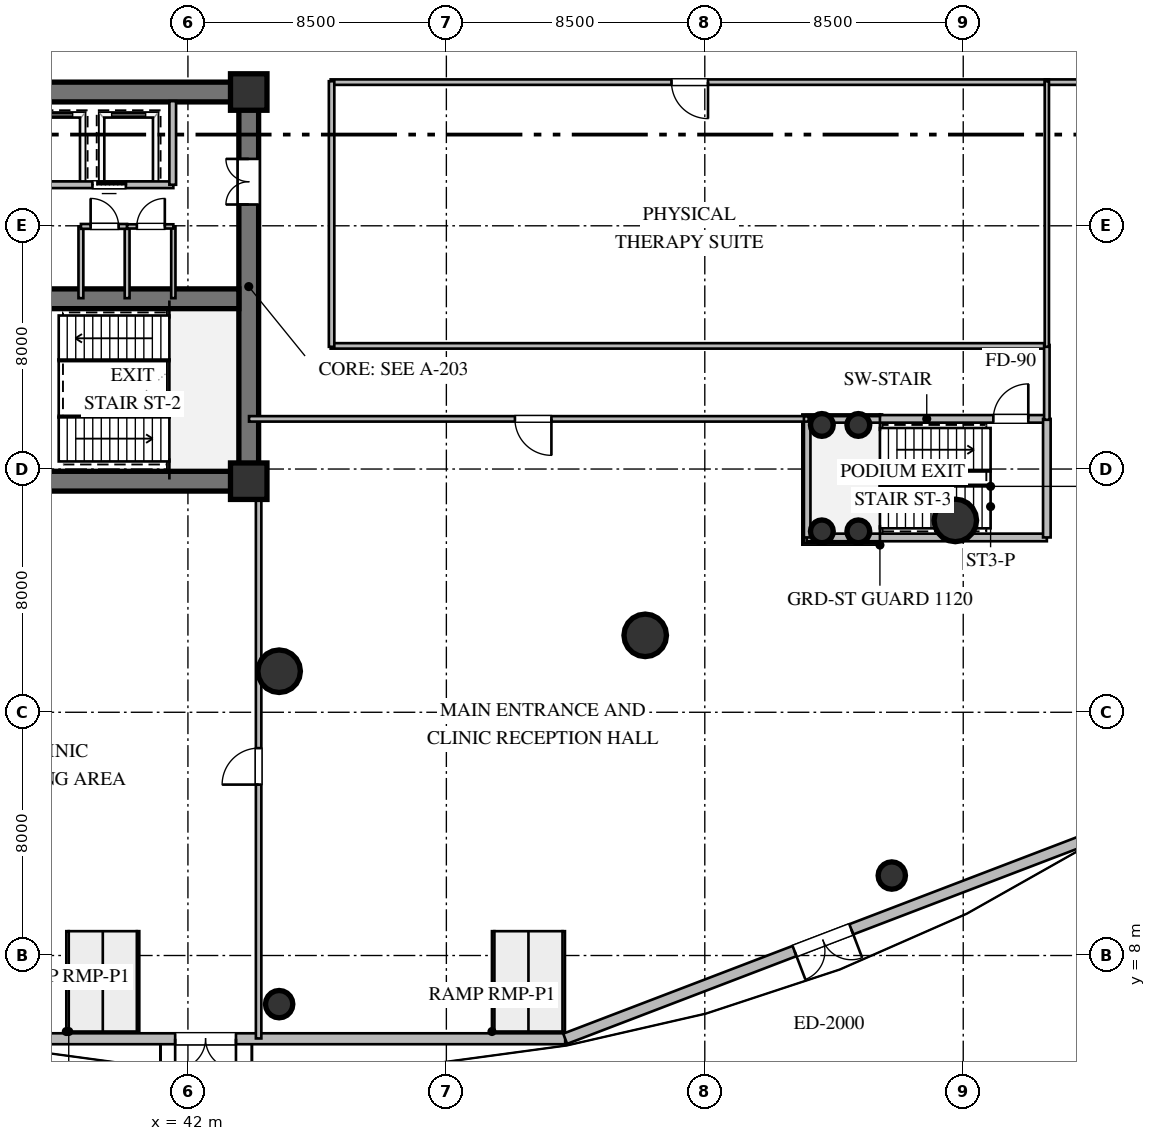
"""IFC4 building model, lengths in metres.
Left out: names, types, materials, properties, quantities, classifications, styles, units other than length and angle.
Written with IfcOpenShell. Run it as: python <this file> out.ifc"""

import sys

from ifc_helpers import new_model, si_unit, direction, frame, frame_2d, origin, origin_2d, place, context, subcontext, project, spatial, rectangle, circle, extrude, element, fill, save


model = new_model("IFC4")
c1 = context("Model", 3, precision=1e-05, world=origin(), true_north=direction((0.0, 1.0)))
c2 = subcontext(c1, "Body", "Model", "MODEL_VIEW")
j1 = project(units=[si_unit("LENGTHUNIT", "METRE"), si_unit("PLANEANGLEUNIT", "RADIAN")], contexts=[c1])
p1 = place(None, origin())
s1 = spatial("IfcSite", under=j1, at=p1, CompositionType="ELEMENT")
p2 = place(p1, origin())
s2 = spatial("IfcBuilding", under=s1, at=p2, CompositionType="ELEMENT")
p3 = place(p2, origin())
s3 = spatial("IfcBuildingStorey", under=s2, at=p3, CompositionType="ELEMENT", Elevation=0.0)
for number, where, z_axis, x_axis in (
    (1, (21.675, 23.6, 0.0), (0.0, 0.0, 1.0), (1.0, 0.0, 0.0)),
    (2, (21.675, 36.4, 0.0), (0.0, 0.0, 1.0), (1.0, 0.0, 0.0)),
):
    element("IfcWall", number, at=place(p3, frame(where, z_axis=z_axis, x_axis=x_axis)), inside=s3, PredefinedType="SHEAR", context=c2, shape_type="SweptSolid", body=[
        extrude(rectangle(XDim=22.65, YDim=0.65, at=frame_2d((11.325, 0.0))), origin(), (0.0, 0.0, 1.0), 4.52),
    ])
p4 = place(p3, frame((44.0, 23.925, 0.0), z_axis=(0.0, 0.0, 1.0), x_axis=(0.0, 1.0, 0.0)))
e3 = element("IfcWall", 3, at=p4, inside=s3, PredefinedType="SHEAR", context=c2, shape_type="SweptSolid", body=[
    extrude(rectangle(XDim=12.15, YDim=0.65, at=frame_2d((6.075, 0.0))), origin(), (0.0, 0.0, 1.0), 4.52),
])
p5 = place(p4, frame((8.775, 0.0, 0.0)))
e4 = element("IfcOpeningElement", 4, at=p5, cuts=e3, PredefinedType="OPENING", context=c2, shape_type="SweptSolid", body=[
    extrude(rectangle(XDim=1.5, YDim=2.15, at=frame_2d((0.75, 1.075))), frame((0.0, 0.335, 0.0), z_axis=(0.0, -1.0, 0.0), x_axis=(1.0, 0.0, 0.0)), (0.0, 0.0, 1.0), 0.67),
])
p6 = place(p3, frame((22.325, 29.6, 0.0), z_axis=(0.0, 0.0, 1.0), x_axis=(1.0, 0.0, 0.0)))
e5 = element("IfcWall", 5, at=p6, inside=s3, PredefinedType="SHEAR", context=c2, shape_type="SweptSolid", body=[
    extrude(rectangle(XDim=21.35, YDim=0.65, at=frame_2d((10.675, 0.0))), origin(), (0.0, 0.0, 1.0), 4.52),
])
p7 = place(p6, frame((12.125, 0.0, 0.0)))
e6 = element("IfcOpeningElement", 6, at=p7, cuts=e5, PredefinedType="OPENING", context=c2, shape_type="SweptSolid", body=[
    extrude(rectangle(XDim=1.15, YDim=2.1, at=frame_2d((0.575, 1.05))), frame((0.0, 0.335, 0.0), z_axis=(0.0, -1.0, 0.0), x_axis=(1.0, 0.0, 0.0)), (0.0, 0.0, 1.0), 0.67),
])
for number, where, z_axis, x_axis in (
    (7, (44.0, 23.6, 0.0), (0.0, 0.0, 1.0), (1.0, 0.0, 0.0)),
    (8, (44.0, 36.4, 0.0), (0.0, 0.0, 1.0), (1.0, 0.0, 0.0)),
):
    element("IfcColumn", number, at=place(p3, frame(where, z_axis=z_axis, x_axis=x_axis)), inside=s3, PredefinedType="COLUMN", context=c2, shape_type="SweptSolid", body=[
        extrude(rectangle(XDim=1.2, YDim=1.2, at=origin_2d()), origin(), (0.0, 0.0, 1.0), 4.8),
    ])
for number, where, z_axis, x_axis in (
    (9, (45.0, 17.35, 0.0), (0.0, 0.0, 1.0), (1.0, 0.0, 0.0)),
    (10, (57.04, 18.53, 0.0), (0.0, 0.0, 1.0), (1.0, 0.0, 0.0)),
    (11, (67.24, 22.31, 0.0), (0.0, 0.0, 1.0), (1.0, 0.0, 0.0)),
):
    element("IfcColumn", number, at=place(p3, frame(where, z_axis=z_axis, x_axis=x_axis)), inside=s3, PredefinedType="COLUMN", context=c2, shape_type="SweptSolid", body=[
        extrude(circle(Radius=0.7, at=origin_2d()), origin(), (0.0, 0.0, 1.0), 4.8),
    ])
for number, where, z_axis, x_axis in (
    (12, (45.0, 6.4, 0.0), (0.0, 0.0, 1.0), (1.0, 0.0, 0.0)),
    (13, (65.15, 10.63, 0.0), (0.0, 0.0, 1.0), (1.0, 0.0, 0.0)),
):
    element("IfcColumn", number, at=place(p3, frame(where, z_axis=z_axis, x_axis=x_axis)), inside=s3, PredefinedType="COLUMN", context=c2, shape_type="SweptSolid", body=[
        extrude(circle(Radius=0.45, at=origin_2d()), origin(), (0.0, 0.0, 1.0), 4.8),
    ])
for number, where, z_axis, x_axis in (
    (14, (62.85, 21.95, 0.0), (0.0, 0.0, 1.0), (1.0, 0.0, 0.0)),
    (15, (62.85, 25.45, 0.0), (0.0, 0.0, 1.0), (1.0, 0.0, 0.0)),
    (16, (64.05, 21.95, 0.0), (0.0, 0.0, 1.0), (1.0, 0.0, 0.0)),
    (17, (64.05, 25.45, 0.0), (0.0, 0.0, 1.0), (1.0, 0.0, 0.0)),
):
    element("IfcColumn", number, at=place(p3, frame(where, z_axis=z_axis, x_axis=x_axis)), inside=s3, PredefinedType="COLUMN", context=c2, shape_type="SweptSolid", body=[
        extrude(circle(Radius=0.375, at=origin_2d()), origin(), (0.0, 0.0, 1.0), 4.8),
    ])
p8 = place(p3, frame((54.408, 5.262, 0.0), z_axis=(0.0, 0.0, 1.0), x_axis=(-1.0, 0.0, 0.0)))
e18 = element("IfcWall", 18, at=p8, inside=s3, PredefinedType="STANDARD", context=c2, shape_type="SweptSolid", body=[
    extrude(rectangle(XDim=18.816, YDim=0.36, at=frame_2d((9.408, 0.0))), origin(), (0.0, 0.0, 1.0), 4.52),
])
p9 = place(p8, frame((10.828, 0.0, 0.0)))
e19 = element("IfcOpeningElement", 19, at=p9, cuts=e18, PredefinedType="OPENING", context=c2, shape_type="SweptSolid", body=[
    extrude(rectangle(XDim=2.0, YDim=2.2, at=frame_2d((1.0, 1.1))), frame((0.0, 0.19, 0.0), z_axis=(0.0, -1.0, 0.0), x_axis=(1.0, 0.0, 0.0)), (0.0, 0.0, 1.0), 0.38),
])
p10 = place(p3, frame((71.361, 11.746, 0.0), z_axis=(0.0, 0.0, 1.0), x_axis=(-0.934014086565, -0.357236176917, 0.0)))
e20 = element("IfcWall", 20, at=p10, inside=s3, PredefinedType="STANDARD", context=c2, shape_type="SweptSolid", body=[
    extrude(rectangle(XDim=18.151, YDim=0.36, at=frame_2d((9.075, 0.0))), origin(), (0.0, 0.0, 1.0), 4.52),
])
p11 = place(p10, frame((8.075, 0.0, 0.0)))
e21 = element("IfcOpeningElement", 21, at=p11, cuts=e20, PredefinedType="OPENING", context=c2, shape_type="SweptSolid", body=[
    extrude(rectangle(XDim=2.0, YDim=2.2, at=frame_2d((1.0, 1.1))), frame((0.0, 0.19, 0.0), z_axis=(0.0, -1.0, 0.0), x_axis=(1.0, 0.0, 0.0)), (0.0, 0.0, 1.0), 0.38),
])
p12 = place(p3, frame((33.98, 33.35, 0.0), z_axis=(0.0, 0.0, 1.0), x_axis=(1.0, 0.0, 0.0)))
e22 = element("IfcWall", 22, at=p12, inside=s3, PredefinedType="SOLIDWALL", context=c2, shape_type="SweptSolid", body=[
    extrude(rectangle(XDim=7.54, YDim=0.22, at=frame_2d((3.77, 0.0))), origin(), (0.0, 0.0, 1.0), 4.52),
])
p13 = place(p12, frame((1.335, 0.0, 0.0)))
e23 = element("IfcOpeningElement", 23, at=p13, cuts=e22, PredefinedType="OPENING", context=c2, shape_type="SweptSolid", body=[
    extrude(rectangle(XDim=1.1, YDim=2.1, at=frame_2d((0.55, 1.05))), frame((0.0, 0.12, 0.0), z_axis=(0.0, -1.0, 0.0), x_axis=(1.0, 0.0, 0.0)), (0.0, 0.0, 1.0), 0.24),
])
p14 = place(p12, frame((4.879, 0.0, 0.0)))
e24 = element("IfcOpeningElement", 24, at=p14, cuts=e22, PredefinedType="OPENING", context=c2, shape_type="SweptSolid", body=[
    extrude(rectangle(XDim=1.1, YDim=2.1, at=frame_2d((0.55, 1.05))), frame((0.0, 0.12, 0.0), z_axis=(0.0, -1.0, 0.0), x_axis=(1.0, 0.0, 0.0)), (0.0, 0.0, 1.0), 0.24),
])
p15 = place(p3, frame((41.5, 33.35, 0.0), z_axis=(0.0, 0.0, 1.0), x_axis=(0.0, 1.0, 0.0)))
e25 = element("IfcWall", 25, at=p15, inside=s3, PredefinedType="SOLIDWALL", context=c2, shape_type="SweptSolid", body=[
    extrude(rectangle(XDim=2.75, YDim=0.22, at=frame_2d((1.375, 0.0))), origin(), (0.0, 0.0, 1.0), 4.52),
])
for number, where, z_axis, x_axis in (
    (26, (38.48, 29.62, 0.0), (0.0, 0.0, 1.0), (0.0, 1.0, 0.0)),
    (27, (40.0, 29.62, 0.0), (0.0, 0.0, 1.0), (0.0, 1.0, 0.0)),
):
    element("IfcWall", number, at=place(p3, frame(where, z_axis=z_axis, x_axis=x_axis)), inside=s3, PredefinedType="PLUMBINGWALL", context=c2, shape_type="SweptSolid", body=[
        extrude(rectangle(XDim=2.36, YDim=0.16, at=frame_2d((1.18, 0.0))), origin(), (0.0, 0.0, 1.0), 4.52),
    ])
p16 = place(p3, frame((41.52, 29.62, 0.0), z_axis=(0.0, 0.0, 1.0), x_axis=(0.0, 1.0, 0.0)))
e28 = element("IfcWall", 28, at=p16, inside=s3, PredefinedType="PARTITIONING", context=c2, shape_type="SweptSolid", body=[
    extrude(rectangle(XDim=2.36, YDim=0.14, at=frame_2d((1.18, 0.0))), origin(), (0.0, 0.0, 1.0), 1.887),
])
p17 = place(p3, frame((38.48, 31.98, 0.0), z_axis=(0.0, 0.0, 1.0), x_axis=(1.0, 0.0, 0.0)))
e29 = element("IfcWall", 29, at=p17, inside=s3, PredefinedType="PLUMBINGWALL", context=c2, shape_type="SweptSolid", body=[
    extrude(rectangle(XDim=1.52, YDim=0.16, at=frame_2d((0.76, 0.0))), origin(), (0.0, 0.0, 1.0), 4.52),
])
p18 = place(p17, frame((0.32, 0.0, 0.0)))
e30 = element("IfcOpeningElement", 30, at=p18, cuts=e29, PredefinedType="OPENING", context=c2, shape_type="SweptSolid", body=[
    extrude(rectangle(XDim=0.92, YDim=2.1, at=frame_2d((0.46, 1.05))), frame((0.0, 0.09, 0.0), z_axis=(0.0, -1.0, 0.0), x_axis=(1.0, 0.0, 0.0)), (0.0, 0.0, 1.0), 0.18),
])
p19 = place(p3, frame((40.0, 31.98, 0.0), z_axis=(0.0, 0.0, 1.0), x_axis=(1.0, 0.0, 0.0)))
e31 = element("IfcWall", 31, at=p19, inside=s3, PredefinedType="PARTITIONING", context=c2, shape_type="SweptSolid", body=[
    extrude(rectangle(XDim=1.52, YDim=0.14, at=frame_2d((0.76, 0.0))), origin(), (0.0, 0.0, 1.0), 4.52),
])
p20 = place(p19, frame((0.32, 0.0, 0.0)))
e32 = element("IfcOpeningElement", 32, at=p20, cuts=e31, PredefinedType="OPENING", context=c2, shape_type="SweptSolid", body=[
    extrude(rectangle(XDim=0.92, YDim=2.1, at=frame_2d((0.46, 1.05))), frame((0.0, 0.08, 0.0), z_axis=(0.0, -1.0, 0.0), x_axis=(1.0, 0.0, 0.0)), (0.0, 0.0, 1.0), 0.16),
])
p21 = place(p3, frame((62.35, 25.65, 0.0), z_axis=(0.0, 0.0, 1.0), x_axis=(1.0, 0.0, 0.0)))
e33 = element("IfcWall", 33, at=p21, inside=s3, PredefinedType="SOLIDWALL", context=c2, shape_type="SweptSolid", body=[
    extrude(rectangle(XDim=7.9, YDim=0.25, at=frame_2d((3.95, 0.0))), origin(), (0.0, 0.0, 1.0), 4.52),
])
p22 = place(p21, frame((6.14, 0.0, 0.0)))
e34 = element("IfcOpeningElement", 34, at=p22, cuts=e33, PredefinedType="OPENING", context=c2, shape_type="SweptSolid", body=[
    extrude(rectangle(XDim=1.15, YDim=2.1, at=frame_2d((0.575, 1.05))), frame((0.0, 0.135, 0.0), z_axis=(0.0, -1.0, 0.0), x_axis=(1.0, 0.0, 0.0)), (0.0, 0.0, 1.0), 0.27),
])
p23 = place(p3, frame((62.35, 21.75, 0.0), z_axis=(0.0, 0.0, 1.0), x_axis=(1.0, 0.0, 0.0)))
e35 = element("IfcWall", 35, at=p23, inside=s3, PredefinedType="SOLIDWALL", context=c2, shape_type="SweptSolid", body=[
    extrude(rectangle(XDim=7.9, YDim=0.25, at=frame_2d((3.95, 0.0))), origin(), (0.0, 0.0, 1.0), 4.52),
])
p24 = place(p3, frame((62.35, 21.75, 0.0), z_axis=(0.0, 0.0, 1.0), x_axis=(0.0, 1.0, 0.0)))
e36 = element("IfcWall", 36, at=p24, inside=s3, PredefinedType="SOLIDWALL", context=c2, shape_type="SweptSolid", body=[
    extrude(rectangle(XDim=3.9, YDim=0.25, at=frame_2d((1.95, 0.0))), origin(), (0.0, 0.0, 1.0), 1.887),
])
p25 = place(p3, frame((70.25, 21.75, 0.0), z_axis=(0.0, 0.0, 1.0), x_axis=(0.0, 1.0, 0.0)))
e37 = element("IfcWall", 37, at=p25, inside=s3, PredefinedType="SOLIDWALL", context=c2, shape_type="SweptSolid", body=[
    extrude(rectangle(XDim=3.9, YDim=0.25, at=frame_2d((1.95, 0.0))), origin(), (0.0, 0.0, 1.0), 4.52),
])
p26 = place(p3, frame((62.415, 25.65, 0.0), z_axis=(0.0, 0.0, 1.0), x_axis=(-1.0, 0.0, 0.0)))
e38 = element("IfcWall", 38, at=p26, inside=s3, PredefinedType="PARTITIONING", context=c2, shape_type="SweptSolid", body=[
    extrude(rectangle(XDim=18.405, YDim=0.18, at=frame_2d((9.203, 0.0))), origin(), (0.0, 0.0, 1.0), 3.966),
])
p27 = place(p26, frame((8.46, 0.0, 0.0)))
e39 = element("IfcOpeningElement", 39, at=p27, cuts=e38, PredefinedType="OPENING", context=c2, shape_type="SweptSolid", body=[
    extrude(rectangle(XDim=1.2, YDim=2.15, at=frame_2d((0.6, 1.075))), frame((0.0, 0.1, 0.0), z_axis=(0.0, -1.0, 0.0), x_axis=(1.0, 0.0, 0.0)), (0.0, 0.0, 1.0), 0.2),
])
p28 = place(p3, frame((70.315, 36.725, 0.0), z_axis=(0.0, 0.0, 1.0), x_axis=(-1.0, 0.0, 0.0)))
e40 = element("IfcWall", 40, at=p28, inside=s3, PredefinedType="PARTITIONING", context=c2, shape_type="SweptSolid", body=[
    extrude(rectangle(XDim=23.62, YDim=0.18, at=frame_2d((11.81, 0.0))), origin(), (0.0, 0.0, 1.0), 3.966),
])
p29 = place(p28, frame((11.21, 0.0, 0.0)))
e41 = element("IfcOpeningElement", 41, at=p29, cuts=e40, PredefinedType="OPENING", context=c2, shape_type="SweptSolid", body=[
    extrude(rectangle(XDim=1.2, YDim=2.15, at=frame_2d((0.6, 1.075))), frame((0.0, 0.1, 0.0), z_axis=(0.0, -1.0, 0.0), x_axis=(1.0, 0.0, 0.0)), (0.0, 0.0, 1.0), 0.2),
])
p30 = place(p3, frame((46.695, 28.05, 0.0), z_axis=(0.0, 0.0, 1.0), x_axis=(1.0, 0.0, 0.0)))
e42 = element("IfcWall", 42, at=p30, inside=s3, PredefinedType="PARTITIONING", context=c2, shape_type="SweptSolid", body=[
    extrude(rectangle(XDim=23.585, YDim=0.18, at=frame_2d((11.792, 0.0))), origin(), (0.0, 0.0, 1.0), 3.966),
])
p31 = place(p3, frame((46.725, 36.755, 0.0), z_axis=(0.0, 0.0, 1.0), x_axis=(0.0, -1.0, 0.0)))
e43 = element("IfcWall", 43, at=p31, inside=s3, PredefinedType="PARTITIONING", context=c2, shape_type="SweptSolid", body=[
    extrude(rectangle(XDim=8.735, YDim=0.18, at=frame_2d((4.367, 0.0))), origin(), (0.0, 0.0, 1.0), 4.52),
])
p32 = place(p3, frame((78.03, 36.725, 0.0), z_axis=(0.0, 0.0, 1.0), x_axis=(-1.0, 0.0, 0.0)))
e44 = element("IfcWall", 44, at=p32, inside=s3, PredefinedType="PARTITIONING", context=c2, shape_type="SweptSolid", body=[
    extrude(rectangle(XDim=7.845, YDim=0.18, at=frame_2d((3.922, 0.0))), origin(), (0.0, 0.0, 1.0), 4.52),
])
p33 = place(p32, frame((3.322, 0.0, 0.0)))
e45 = element("IfcOpeningElement", 45, at=p33, cuts=e44, PredefinedType="OPENING", context=c2, shape_type="SweptSolid", body=[
    extrude(rectangle(XDim=1.2, YDim=2.15, at=frame_2d((0.6, 1.075))), frame((0.0, 0.1, 0.0), z_axis=(0.0, -1.0, 0.0), x_axis=(1.0, 0.0, 0.0)), (0.0, 0.0, 1.0), 0.2),
])
p34 = place(p3, frame((70.25, 28.08, 0.0), z_axis=(0.0, 0.0, 1.0), x_axis=(0.0, -1.0, 0.0)))
e46 = element("IfcWall", 46, at=p34, inside=s3, PredefinedType="PARTITIONING", context=c2, shape_type="SweptSolid", body=[
    extrude(rectangle(XDim=2.46, YDim=0.18, at=frame_2d((1.23, 0.0))), origin(), (0.0, 0.0, 1.0), 4.52),
])
p35 = place(p3, frame((44.325, 5.272, 0.0), z_axis=(0.0, 0.0, 1.0), x_axis=(0.0, 1.0, 0.0)))
e47 = element("IfcWall", 47, at=p35, inside=s3, PredefinedType="PARTITIONING", context=c2, shape_type="SweptSolid", body=[
    extrude(rectangle(XDim=18.318, YDim=0.18, at=frame_2d((9.159, 0.0))), origin(), (0.0, 0.0, 1.0), 3.66),
])
p36 = place(p35, frame((8.349, 0.0, 0.0)))
e48 = element("IfcOpeningElement", 48, at=p36, cuts=e47, PredefinedType="OPENING", context=c2, shape_type="SweptSolid", body=[
    extrude(rectangle(XDim=1.2, YDim=2.15, at=frame_2d((0.6, 1.075))), frame((0.0, 0.1, 0.0), z_axis=(0.0, -1.0, 0.0), x_axis=(1.0, 0.0, 0.0)), (0.0, 0.0, 1.0), 0.2),
])
p37 = place(p3, frame((70.25, 36.755, 0.0), z_axis=(0.0, 0.0, 1.0), x_axis=(0.0, -1.0, 0.0)))
e49 = element("IfcWall", 49, at=p37, inside=s3, PredefinedType="PARTITIONING", context=c2, shape_type="SweptSolid", body=[
    extrude(rectangle(XDim=8.735, YDim=0.14, at=frame_2d((4.367, 0.0))), origin(), (0.0, 0.0, 1.0), 4.52),
])
p38 = place(p9, origin())
e50 = element("IfcDoor", 50, at=p38, inside=s3, OperationType="DOUBLE_DOOR_SINGLE_SWING", PredefinedType="DOOR", context=c2, shape_type="SweptSolid", body=[
    extrude(rectangle(XDim=2.0, YDim=2.2, at=frame_2d((1.0, 1.1))), frame((0.0, 0.025, 0.0), z_axis=(0.0, -1.0, 0.0), x_axis=(1.0, 0.0, 0.0)), (0.0, 0.0, 1.0), 0.05),
])
fill(e19, e50)
p39 = place(p11, origin())
e51 = element("IfcDoor", 51, at=p39, inside=s3, OperationType="DOUBLE_DOOR_SINGLE_SWING", PredefinedType="DOOR", context=c2, shape_type="SweptSolid", body=[
    extrude(rectangle(XDim=2.0, YDim=2.2, at=frame_2d((1.0, 1.1))), frame((0.0, 0.025, 0.0), z_axis=(0.0, -1.0, 0.0), x_axis=(1.0, 0.0, 0.0)), (0.0, 0.0, 1.0), 0.05),
])
fill(e21, e51)
p40 = place(p5, origin())
e52 = element("IfcDoor", 52, at=p40, inside=s3, OperationType="DOUBLE_DOOR_SINGLE_SWING", PredefinedType="DOOR", context=c2, shape_type="SweptSolid", body=[
    extrude(rectangle(XDim=1.5, YDim=2.15, at=frame_2d((0.75, 1.075))), frame((0.0, 0.025, 0.0), z_axis=(0.0, -1.0, 0.0), x_axis=(1.0, 0.0, 0.0)), (0.0, 0.0, 1.0), 0.05),
])
fill(e4, e52)
p41 = place(p14, origin())
e53 = element("IfcDoor", 53, at=p41, inside=s3, OperationType="SLIDING_TO_RIGHT", PredefinedType="DOOR", context=c2, shape_type="SweptSolid", body=[
    extrude(rectangle(XDim=1.1, YDim=2.1, at=frame_2d((0.55, 1.05))), frame((0.0, 0.025, 0.0), z_axis=(0.0, -1.0, 0.0), x_axis=(1.0, 0.0, 0.0)), (0.0, 0.0, 1.0), 0.05),
])
fill(e24, e53)
p42 = place(p18, origin())
e54 = element("IfcDoor", 54, at=p42, inside=s3, OperationType="SINGLE_SWING_LEFT", PredefinedType="DOOR", context=c2, shape_type="SweptSolid", body=[
    extrude(rectangle(XDim=0.92, YDim=2.1, at=frame_2d((0.46, 1.05))), frame((0.0, 0.025, 0.0), z_axis=(0.0, -1.0, 0.0), x_axis=(1.0, 0.0, 0.0)), (0.0, 0.0, 1.0), 0.05),
])
fill(e30, e54)
p43 = place(p20, origin())
e55 = element("IfcDoor", 55, at=p43, inside=s3, OperationType="SINGLE_SWING_RIGHT", PredefinedType="DOOR", context=c2, shape_type="SweptSolid", body=[
    extrude(rectangle(XDim=0.92, YDim=2.1, at=frame_2d((0.46, 1.05))), frame((0.0, 0.025, 0.0), z_axis=(0.0, -1.0, 0.0), x_axis=(1.0, 0.0, 0.0)), (0.0, 0.0, 1.0), 0.05),
])
fill(e32, e55)
p44 = place(p22, origin())
e56 = element("IfcDoor", 56, at=p44, inside=s3, OperationType="SINGLE_SWING_RIGHT", PredefinedType="DOOR", context=c2, shape_type="SweptSolid", body=[
    extrude(rectangle(XDim=1.15, YDim=2.1, at=frame_2d((0.575, 1.05))), frame((0.0, 0.025, 0.0), z_axis=(0.0, -1.0, 0.0), x_axis=(1.0, 0.0, 0.0)), (0.0, 0.0, 1.0), 0.05),
])
fill(e34, e56)
p45 = place(p27, origin())
e57 = element("IfcDoor", 57, at=p45, inside=s3, OperationType="SINGLE_SWING_LEFT", PredefinedType="DOOR", context=c2, shape_type="SweptSolid", body=[
    extrude(rectangle(XDim=1.2, YDim=2.15, at=frame_2d((0.6, 1.075))), frame((0.0, 0.025, 0.0), z_axis=(0.0, -1.0, 0.0), x_axis=(1.0, 0.0, 0.0)), (0.0, 0.0, 1.0), 0.05),
])
fill(e39, e57)
p46 = place(p29, origin())
e58 = element("IfcDoor", 58, at=p46, inside=s3, OperationType="SINGLE_SWING_LEFT", PredefinedType="DOOR", context=c2, shape_type="SweptSolid", body=[
    extrude(rectangle(XDim=1.2, YDim=2.15, at=frame_2d((0.6, 1.075))), frame((0.0, 0.025, 0.0), z_axis=(0.0, -1.0, 0.0), x_axis=(1.0, 0.0, 0.0)), (0.0, 0.0, 1.0), 0.05),
])
fill(e41, e58)
p47 = place(p36, origin())
e59 = element("IfcDoor", 59, at=p47, inside=s3, OperationType="SINGLE_SWING_LEFT", PredefinedType="DOOR", context=c2, shape_type="SweptSolid", body=[
    extrude(rectangle(XDim=1.2, YDim=2.15, at=frame_2d((0.6, 1.075))), frame((0.0, 0.025, 0.0), z_axis=(0.0, -1.0, 0.0), x_axis=(1.0, 0.0, 0.0)), (0.0, 0.0, 1.0), 0.05),
])
fill(e48, e59)
save(model, sys.argv[1])
